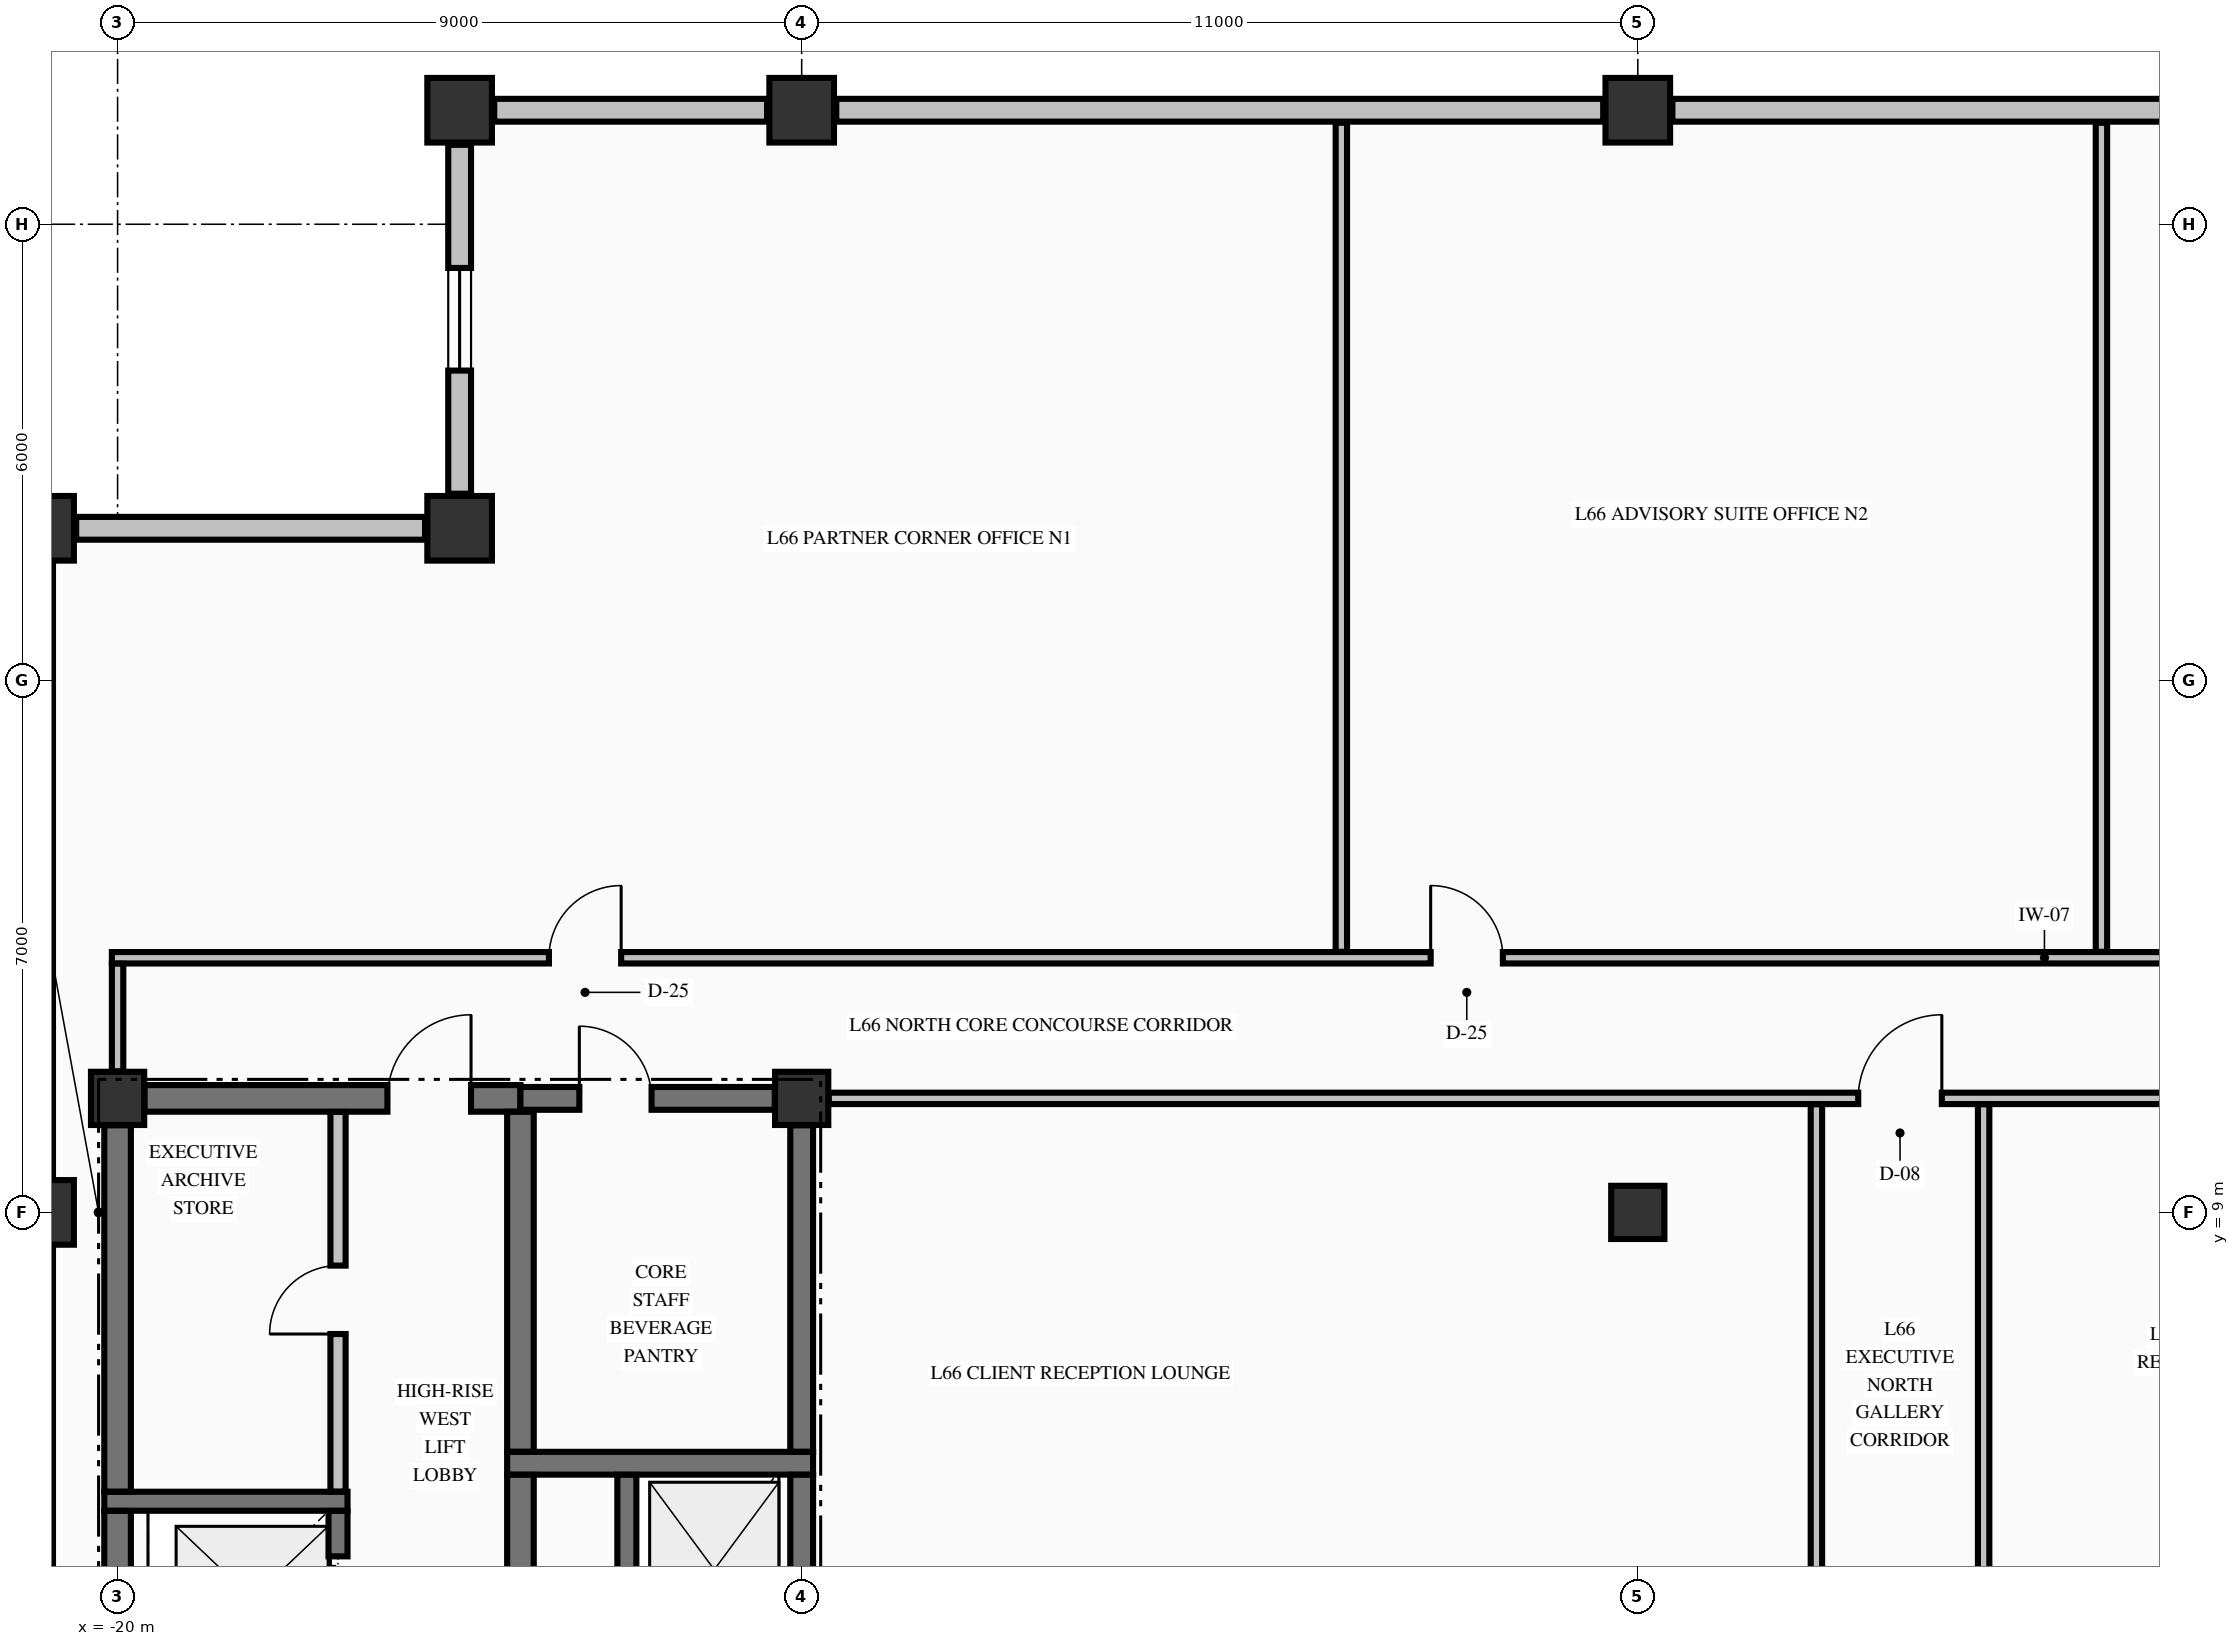
"""IFC4 building model, lengths in metres.
Left out: names, types, materials, properties, quantities, classifications, styles, units other than length and angle.
Written with IfcOpenShell. Run it as: python <this file> out.ifc"""

import sys

from ifc_helpers import new_model, si_unit, direction, frame, frame_2d, origin, origin_2d, place, context, subcontext, project, spatial, rectangle, extrude, element, fill, save


model = new_model("IFC4")
c1 = context("Model", 3, precision=1e-05, world=origin(), true_north=direction((0.0, 1.0)))
c2 = subcontext(c1, "Body", "Model", "MODEL_VIEW")
j1 = project(units=[si_unit("LENGTHUNIT", "METRE"), si_unit("PLANEANGLEUNIT", "RADIAN")], contexts=[c1])
p1 = place(None, origin())
s1 = spatial("IfcSite", under=j1, at=p1, CompositionType="ELEMENT")
p2 = place(p1, origin())
s2 = spatial("IfcBuilding", under=s1, at=p2, CompositionType="ELEMENT")
p3 = place(p2, frame((0.0, 0.0, 249.43)))
s3 = spatial("IfcBuildingStorey", under=s2, at=p3, CompositionType="ELEMENT", Elevation=249.43)
for number, where, z_axis, x_axis in (
    (1, (-15.5, 23.5, -0.425), (0.0, 0.0, 1.0), (1.0, 0.0, 0.0)),
    (2, (-11.0, 23.5, -0.425), (0.0, 0.0, 1.0), (1.0, 0.0, 0.0)),
    (3, (0.0, 23.5, -0.425), (0.0, 0.0, 1.0), (1.0, 0.0, 0.0)),
    (4, (-21.0, 9.0, -0.425), (0.0, 0.0, 1.0), (1.0, 0.0, 0.0)),
    (5, (-21.0, 18.0, -0.425), (0.0, 0.0, 1.0), (1.0, 0.0, 0.0)),
    (6, (-15.5, 18.0, -0.425), (0.0, 0.0, 1.0), (1.0, 0.0, 0.0)),
):
    element("IfcColumn", number, at=place(p3, frame(where, z_axis=z_axis, x_axis=x_axis)), inside=s3, PredefinedType="COLUMN", context=c2, shape_type="SweptSolid", body=[
        extrude(rectangle(XDim=0.85, YDim=0.85, at=origin_2d()), origin(), (0.0, 0.0, 1.0), 5.0),
    ])
for number, where, z_axis, x_axis in (
    (7, (-20.0, 10.5, -0.425), (0.0, 0.0, 1.0), (1.0, 0.0, 0.0)),
    (8, (-11.0, 10.5, -0.425), (0.0, 0.0, 1.0), (1.0, 0.0, 0.0)),
    (9, (0.0, 9.0, -0.425), (0.0, 0.0, 1.0), (1.0, 0.0, 0.0)),
):
    element("IfcColumn", number, at=place(p3, frame(where, z_axis=z_axis, x_axis=x_axis)), inside=s3, PredefinedType="COLUMN", context=c2, shape_type="SweptSolid", body=[
        extrude(rectangle(XDim=0.7, YDim=0.7, at=origin_2d()), origin(), (0.0, 0.0, 1.0), 5.0),
    ])
p4 = place(p3, frame((-15.5, 23.045, 0.0), z_axis=(0.0, 0.0, 1.0), x_axis=(0.0, -1.0, 0.0)))
e10 = element("IfcWall", 10, at=p4, inside=s3, PredefinedType="STANDARD", context=c2, shape_type="SweptSolid", body=[
    extrude(rectangle(XDim=4.59, YDim=0.3, at=frame_2d((2.295, 0.0))), origin(), (0.0, 0.0, 1.0), 2.767),
])
p5 = place(p4, frame((1.62, 0.0, 0.68)))
e11 = element("IfcOpeningElement", 11, at=p5, cuts=e10, PredefinedType="OPENING", context=c2, shape_type="SweptSolid", body=[
    extrude(rectangle(XDim=1.35, YDim=1.42, at=frame_2d((0.675, 0.71))), frame((0.0, 0.16, 0.0), z_axis=(0.0, -1.0, 0.0), x_axis=(1.0, 0.0, 0.0)), (0.0, 0.0, 1.0), 0.32),
])
p6 = place(p3, frame((-15.955, 18.0, 0.0), z_axis=(0.0, 0.0, 1.0), x_axis=(-1.0, 0.0, 0.0)))
e12 = element("IfcWall", 12, at=p6, inside=s3, PredefinedType="STANDARD", context=c2, shape_type="SweptSolid", body=[
    extrude(rectangle(XDim=4.59, YDim=0.3, at=frame_2d((2.295, 0.0))), origin(), (0.0, 0.0, 1.0), 2.167),
])
p7 = place(p3, frame((-11.455, 23.5, 0.0), z_axis=(0.0, 0.0, 1.0), x_axis=(-1.0, 0.0, 0.0)))
e13 = element("IfcWall", 13, at=p7, inside=s3, PredefinedType="STANDARD", context=c2, shape_type="SweptSolid", body=[
    extrude(rectangle(XDim=3.59, YDim=0.3, at=frame_2d((1.795, 0.0))), origin(), (0.0, 0.0, 1.0), 2.167),
])
for number, where, z_axis, x_axis in (
    (14, (-0.455, 23.5, 0.0), (0.0, 0.0, 1.0), (-1.0, 0.0, 0.0)),
    (15, (10.545, 23.5, 0.0), (0.0, 0.0, 1.0), (-1.0, 0.0, 0.0)),
):
    element("IfcWall", number, at=place(p3, frame(where, z_axis=z_axis, x_axis=x_axis)), inside=s3, PredefinedType="STANDARD", context=c2, shape_type="SweptSolid", body=[
        extrude(rectangle(XDim=10.09, YDim=0.3, at=frame_2d((5.045, 0.0))), origin(), (0.0, 0.0, 1.0), 2.167),
    ])
for number, where, z_axis, x_axis in (
    (16, (-21.0, 8.545, 0.0), (0.0, 0.0, 1.0), (0.0, -1.0, 0.0)),
    (17, (-21.0, 17.545, 0.0), (0.0, 0.0, 1.0), (0.0, -1.0, 0.0)),
):
    element("IfcWall", number, at=place(p3, frame(where, z_axis=z_axis, x_axis=x_axis)), inside=s3, PredefinedType="STANDARD", context=c2, shape_type="SweptSolid", body=[
        extrude(rectangle(XDim=8.09, YDim=0.3, at=frame_2d((4.045, 0.0))), origin(), (0.0, 0.0, 1.0), 2.167),
    ])
p8 = place(p3, frame((-20.175, 5.2, 0.0), z_axis=(0.0, 0.0, 1.0), x_axis=(1.0, 0.0, 0.0)))
e18 = element("IfcWall", 18, at=p8, inside=s3, PredefinedType="SOLIDWALL", context=c2, shape_type="SweptSolid", body=[
    extrude(rectangle(XDim=3.2, YDim=0.25, at=frame_2d((1.6, 0.0))), origin(), (0.0, 0.0, 1.0), 4.575),
])
p9 = place(p3, frame((-14.875, 5.7, 0.0), z_axis=(0.0, 0.0, 1.0), x_axis=(1.0, 0.0, 0.0)))
e19 = element("IfcWall", 19, at=p9, inside=s3, PredefinedType="SHEAR", context=c2, shape_type="SweptSolid", body=[
    extrude(rectangle(XDim=4.025, YDim=0.3, at=frame_2d((2.012, 0.0))), origin(), (0.0, 0.0, 1.0), 4.575),
])
p10 = place(p3, frame((-19.646, 10.5, 0.0), z_axis=(0.0, 0.0, 1.0), x_axis=(1.0, 0.0, 0.0)))
e20 = element("IfcWall", 20, at=p10, inside=s3, PredefinedType="SHEAR", context=c2, shape_type="SweptSolid", body=[
    extrude(rectangle(XDim=4.946, YDim=0.35, at=frame_2d((2.473, 0.0))), origin(), (0.0, 0.0, 1.0), 4.575),
])
p11 = place(p10, frame((3.196, 0.0, 0.0)))
e21 = element("IfcOpeningElement", 21, at=p11, cuts=e20, PredefinedType="OPENING", context=c2, shape_type="SweptSolid", body=[
    extrude(rectangle(XDim=1.1, YDim=2.15, at=frame_2d((0.55, 1.075))), frame((0.0, 0.185, 0.0), z_axis=(0.0, -1.0, 0.0), x_axis=(1.0, 0.0, 0.0)), (0.0, 0.0, 1.0), 0.37),
])
p12 = place(p3, frame((-14.7, 10.5, 0.0), z_axis=(0.0, 0.0, 1.0), x_axis=(1.0, 0.0, 0.0)))
e22 = element("IfcWall", 22, at=p12, inside=s3, PredefinedType="SHEAR", context=c2, shape_type="SweptSolid", body=[
    extrude(rectangle(XDim=3.346, YDim=0.3, at=frame_2d((1.673, 0.0))), origin(), (0.0, 0.0, 1.0), 4.575),
])
p13 = place(p12, frame((0.775, 0.0, 0.0)))
e23 = element("IfcOpeningElement", 23, at=p13, cuts=e22, PredefinedType="OPENING", context=c2, shape_type="SweptSolid", body=[
    extrude(rectangle(XDim=0.95, YDim=2.15, at=frame_2d((0.475, 1.075))), frame((0.0, 0.16, 0.0), z_axis=(0.0, -1.0, 0.0), x_axis=(1.0, 0.0, 0.0)), (0.0, 0.0, 1.0), 0.32),
])
p14 = place(p3, frame((-10.644, 10.5, 0.0), z_axis=(0.0, 0.0, 1.0), x_axis=(1.0, 0.0, 0.0)))
e24 = element("IfcWall", 24, at=p14, inside=s3, PredefinedType="PARTITIONING", context=c2, shape_type="SweptSolid", body=[
    extrude(rectangle(XDim=21.288, YDim=0.15, at=frame_2d((10.644, 0.0))), origin(), (0.0, 0.0, 1.0), 4.575),
])
p15 = place(p14, frame((13.544, 0.0, 0.0)))
e25 = element("IfcOpeningElement", 25, at=p15, cuts=e24, PredefinedType="OPENING", context=c2, shape_type="SweptSolid", body=[
    extrude(rectangle(XDim=1.1, YDim=2.15, at=frame_2d((0.55, 1.075))), frame((0.0, 0.085, 0.0), z_axis=(0.0, -1.0, 0.0), x_axis=(1.0, 0.0, 0.0)), (0.0, 0.0, 1.0), 0.17),
])
p16 = place(p3, frame((-20.075, 12.35, 0.0), z_axis=(0.0, 0.0, 1.0), x_axis=(1.0, 0.0, 0.0)))
e26 = element("IfcWall", 26, at=p16, inside=s3, PredefinedType="PARTITIONING", context=c2, shape_type="SweptSolid", body=[
    extrude(rectangle(XDim=45.91, YDim=0.15, at=frame_2d((22.955, 0.0))), origin(), (0.0, 0.0, 1.0), 2.167),
])
p17 = place(p16, frame((5.75, 0.0, 0.0)))
e27 = element("IfcOpeningElement", 27, at=p17, cuts=e26, PredefinedType="OPENING", context=c2, shape_type="SweptSolid", body=[
    extrude(rectangle(XDim=0.95, YDim=2.02, at=frame_2d((0.475, 1.01))), frame((0.0, 0.085, 0.0), z_axis=(0.0, -1.0, 0.0), x_axis=(1.0, 0.0, 0.0)), (0.0, 0.0, 1.0), 0.17),
])
p18 = place(p16, frame((17.35, 0.0, 0.0)))
e28 = element("IfcOpeningElement", 28, at=p18, cuts=e26, PredefinedType="OPENING", context=c2, shape_type="SweptSolid", body=[
    extrude(rectangle(XDim=0.95, YDim=2.02, at=frame_2d((0.475, 1.01))), frame((0.0, 0.085, 0.0), z_axis=(0.0, -1.0, 0.0), x_axis=(1.0, 0.0, 0.0)), (0.0, 0.0, 1.0), 0.17),
])
p19 = place(p16, frame((32.55, 0.0, 0.0)))
e29 = element("IfcOpeningElement", 29, at=p19, cuts=e26, PredefinedType="OPENING", context=c2, shape_type="SweptSolid", body=[
    extrude(rectangle(XDim=0.95, YDim=2.02, at=frame_2d((0.475, 1.01))), frame((0.0, 0.085, 0.0), z_axis=(0.0, -1.0, 0.0), x_axis=(1.0, 0.0, 0.0)), (0.0, 0.0, 1.0), 0.17),
])
p20 = place(p3, frame((-20.0, 2.777, 0.0), z_axis=(0.0, 0.0, 1.0), x_axis=(0.0, 1.0, 0.0)))
e30 = element("IfcWall", 30, at=p20, inside=s3, PredefinedType="SHEAR", context=c2, shape_type="SweptSolid", body=[
    extrude(rectangle(XDim=2.296, YDim=0.35, at=frame_2d((1.148, 0.0))), origin(), (0.0, 0.0, 1.0), 4.575),
])
p21 = place(p3, frame((-20.0, 5.327, 0.0), z_axis=(0.0, 0.0, 1.0), x_axis=(0.0, 1.0, 0.0)))
e31 = element("IfcWall", 31, at=p21, inside=s3, PredefinedType="SHEAR", context=c2, shape_type="SweptSolid", body=[
    extrude(rectangle(XDim=4.819, YDim=0.35, at=frame_2d((2.41, 0.0))), origin(), (0.0, 0.0, 1.0), 4.575),
])
p22 = place(p3, frame((-17.1, 2.777, 0.0), z_axis=(0.0, 0.0, 1.0), x_axis=(0.0, 1.0, 0.0)))
e32 = element("IfcWall", 32, at=p22, inside=s3, PredefinedType="SOLIDWALL", context=c2, shape_type="SweptSolid", body=[
    extrude(rectangle(XDim=2.296, YDim=0.25, at=frame_2d((1.148, 0.0))), origin(), (0.0, 0.0, 1.0), 4.575),
])
p23 = place(p22, frame((0.598, 0.0, 0.0)))
e33 = element("IfcOpeningElement", 33, at=p23, cuts=e32, PredefinedType="OPENING", context=c2, shape_type="SweptSolid", body=[
    extrude(rectangle(XDim=1.1, YDim=2.2, at=frame_2d((0.55, 1.1))), frame((0.0, 0.135, 0.0), z_axis=(0.0, -1.0, 0.0), x_axis=(1.0, 0.0, 0.0)), (0.0, 0.0, 1.0), 0.27),
])
p24 = place(p3, frame((-14.7, 3.052, 0.0), z_axis=(0.0, 0.0, 1.0), x_axis=(0.0, 1.0, 0.0)))
e34 = element("IfcWall", 34, at=p24, inside=s3, PredefinedType="SHEAR", context=c2, shape_type="SweptSolid", body=[
    extrude(rectangle(XDim=2.496, YDim=0.35, at=frame_2d((1.248, 0.0))), origin(), (0.0, 0.0, 1.0), 4.575),
])
p25 = place(p3, frame((-14.7, 5.852, 0.0), z_axis=(0.0, 0.0, 1.0), x_axis=(0.0, 1.0, 0.0)))
e35 = element("IfcWall", 35, at=p25, inside=s3, PredefinedType="SHEAR", context=c2, shape_type="SweptSolid", body=[
    extrude(rectangle(XDim=4.471, YDim=0.35, at=frame_2d((2.235, 0.0))), origin(), (0.0, 0.0, 1.0), 4.575),
])
p26 = place(p3, frame((-13.3, 3.052, 0.0), z_axis=(0.0, 0.0, 1.0), x_axis=(0.0, 1.0, 0.0)))
e36 = element("IfcWall", 36, at=p26, inside=s3, PredefinedType="SOLIDWALL", context=c2, shape_type="SweptSolid", body=[
    extrude(rectangle(XDim=2.496, YDim=0.25, at=frame_2d((1.248, 0.0))), origin(), (0.0, 0.0, 1.0), 4.575),
])
p27 = place(p3, frame((-11.0, 3.052, 0.0), z_axis=(0.0, 0.0, 1.0), x_axis=(0.0, 1.0, 0.0)))
e37 = element("IfcWall", 37, at=p27, inside=s3, PredefinedType="SHEAR", context=c2, shape_type="SweptSolid", body=[
    extrude(rectangle(XDim=2.496, YDim=0.3, at=frame_2d((1.248, 0.0))), origin(), (0.0, 0.0, 1.0), 4.575),
])
p28 = place(p3, frame((-11.0, 5.852, 0.0), z_axis=(0.0, 0.0, 1.0), x_axis=(0.0, 1.0, 0.0)))
e38 = element("IfcWall", 38, at=p28, inside=s3, PredefinedType="SHEAR", context=c2, shape_type="SweptSolid", body=[
    extrude(rectangle(XDim=4.294, YDim=0.3, at=frame_2d((2.147, 0.0))), origin(), (0.0, 0.0, 1.0), 4.575),
])
p29 = place(p3, frame((-20.0, 10.856, 0.0), z_axis=(0.0, 0.0, 1.0), x_axis=(0.0, 1.0, 0.0)))
e39 = element("IfcWall", 39, at=p29, inside=s3, PredefinedType="PARTITIONING", context=c2, shape_type="SweptSolid", body=[
    extrude(rectangle(XDim=1.416, YDim=0.15, at=frame_2d((0.708, 0.0))), origin(), (0.0, 0.0, 1.0), 4.165),
])
p30 = place(p3, frame((-17.1, 5.328, 0.0), z_axis=(0.0, 0.0, 1.0), x_axis=(0.0, 1.0, 0.0)))
e40 = element("IfcWall", 40, at=p30, inside=s3, PredefinedType="PARTITIONING", context=c2, shape_type="SweptSolid", body=[
    extrude(rectangle(XDim=4.994, YDim=0.2, at=frame_2d((2.497, 0.0))), origin(), (0.0, 0.0, 1.0), 4.575),
])
p31 = place(p30, frame((2.072, 0.0, 0.0)))
e41 = element("IfcOpeningElement", 41, at=p31, cuts=e40, PredefinedType="OPENING", context=c2, shape_type="SweptSolid", body=[
    extrude(rectangle(XDim=0.9, YDim=2.15, at=frame_2d((0.45, 1.075))), frame((0.0, 0.11, 0.0), z_axis=(0.0, -1.0, 0.0), x_axis=(1.0, 0.0, 0.0)), (0.0, 0.0, 1.0), 0.22),
])
p32 = place(p3, frame((-3.9, 12.428, 0.0), z_axis=(0.0, 0.0, 1.0), x_axis=(0.0, 1.0, 0.0)))
e42 = element("IfcWall", 42, at=p32, inside=s3, PredefinedType="PARTITIONING", context=c2, shape_type="SweptSolid", body=[
    extrude(rectangle(XDim=10.907, YDim=0.15, at=frame_2d((5.454, 0.0))), origin(), (0.0, 0.0, 1.0), 4.575),
])
for number, where, z_axis, x_axis in (
    (43, (2.35, 2.978, 0.0), (0.0, 0.0, 1.0), (0.0, 1.0, 0.0)),
    (44, (4.55, 2.978, 0.0), (0.0, 0.0, 1.0), (0.0, 1.0, 0.0)),
):
    element("IfcWall", number, at=place(p3, frame(where, z_axis=z_axis, x_axis=x_axis)), inside=s3, PredefinedType="PARTITIONING", context=c2, shape_type="SweptSolid", body=[
        extrude(rectangle(XDim=7.444, YDim=0.15, at=frame_2d((3.722, 0.0))), origin(), (0.0, 0.0, 1.0), 4.575),
    ])
p33 = place(p3, frame((6.1, 12.428, 0.0), z_axis=(0.0, 0.0, 1.0), x_axis=(0.0, 1.0, 0.0)))
e45 = element("IfcWall", 45, at=p33, inside=s3, PredefinedType="PARTITIONING", context=c2, shape_type="SweptSolid", body=[
    extrude(rectangle(XDim=10.907, YDim=0.15, at=frame_2d((5.454, 0.0))), origin(), (0.0, 0.0, 1.0), 4.575),
])
p34 = place(p5, origin())
e46 = element("IfcWindow", 46, at=p34, inside=s3, PartitioningType="SINGLE_PANEL", PredefinedType="WINDOW", context=c2, shape_type="SweptSolid", body=[
    extrude(rectangle(XDim=1.35, YDim=1.42, at=frame_2d((0.675, 0.71))), frame((0.0, 0.03, 0.0), z_axis=(0.0, -1.0, 0.0), x_axis=(1.0, 0.0, 0.0)), (0.0, 0.0, 1.0), 0.06),
])
fill(e11, e46)
p35 = place(p13, origin())
e47 = element("IfcDoor", 47, at=p35, inside=s3, OperationType="SINGLE_SWING_LEFT", PredefinedType="DOOR", context=c2, shape_type="SweptSolid", body=[
    extrude(rectangle(XDim=0.95, YDim=2.15, at=frame_2d((0.475, 1.075))), frame((0.0, 0.025, 0.0), z_axis=(0.0, -1.0, 0.0), x_axis=(1.0, 0.0, 0.0)), (0.0, 0.0, 1.0), 0.05),
])
fill(e23, e47)
p36 = place(p23, origin())
e48 = element("IfcDoor", 48, at=p36, inside=s3, OperationType="SLIDING_TO_LEFT", PredefinedType="DOOR", context=c2, shape_type="SweptSolid", body=[
    extrude(rectangle(XDim=1.1, YDim=2.2, at=frame_2d((0.55, 1.1))), frame((0.0, 0.025, 0.0), z_axis=(0.0, -1.0, 0.0), x_axis=(1.0, 0.0, 0.0)), (0.0, 0.0, 1.0), 0.05),
])
fill(e33, e48)
p37 = place(p11, origin())
e49 = element("IfcDoor", 49, at=p37, inside=s3, OperationType="SINGLE_SWING_RIGHT", PredefinedType="DOOR", context=c2, shape_type="SweptSolid", body=[
    extrude(rectangle(XDim=1.1, YDim=2.15, at=frame_2d((0.55, 1.075))), frame((0.0, 0.025, 0.0), z_axis=(0.0, -1.0, 0.0), x_axis=(1.0, 0.0, 0.0)), (0.0, 0.0, 1.0), 0.05),
])
fill(e21, e49)
p38 = place(p31, origin())
e50 = element("IfcDoor", 50, at=p38, inside=s3, OperationType="SINGLE_SWING_LEFT", PredefinedType="DOOR", context=c2, shape_type="SweptSolid", body=[
    extrude(rectangle(XDim=0.9, YDim=2.15, at=frame_2d((0.45, 1.075))), frame((0.0, 0.025, 0.0), z_axis=(0.0, -1.0, 0.0), x_axis=(1.0, 0.0, 0.0)), (0.0, 0.0, 1.0), 0.05),
])
fill(e41, e50)
p39 = place(p15, origin())
e51 = element("IfcDoor", 51, at=p39, inside=s3, OperationType="SINGLE_SWING_RIGHT", PredefinedType="DOOR", context=c2, shape_type="SweptSolid", body=[
    extrude(rectangle(XDim=1.1, YDim=2.15, at=frame_2d((0.55, 1.075))), frame((0.0, 0.025, 0.0), z_axis=(0.0, -1.0, 0.0), x_axis=(1.0, 0.0, 0.0)), (0.0, 0.0, 1.0), 0.05),
])
fill(e25, e51)
p40 = place(p17, origin())
e52 = element("IfcDoor", 52, at=p40, inside=s3, OperationType="SINGLE_SWING_RIGHT", PredefinedType="DOOR", context=c2, shape_type="SweptSolid", body=[
    extrude(rectangle(XDim=0.95, YDim=2.02, at=frame_2d((0.475, 1.01))), frame((0.0, 0.025, 0.0), z_axis=(0.0, -1.0, 0.0), x_axis=(1.0, 0.0, 0.0)), (0.0, 0.0, 1.0), 0.05),
])
fill(e27, e52)
p41 = place(p18, origin())
e53 = element("IfcDoor", 53, at=p41, inside=s3, OperationType="SINGLE_SWING_LEFT", PredefinedType="DOOR", context=c2, shape_type="SweptSolid", body=[
    extrude(rectangle(XDim=0.95, YDim=2.02, at=frame_2d((0.475, 1.01))), frame((0.0, 0.025, 0.0), z_axis=(0.0, -1.0, 0.0), x_axis=(1.0, 0.0, 0.0)), (0.0, 0.0, 1.0), 0.05),
])
fill(e28, e53)
save(model, sys.argv[1])
